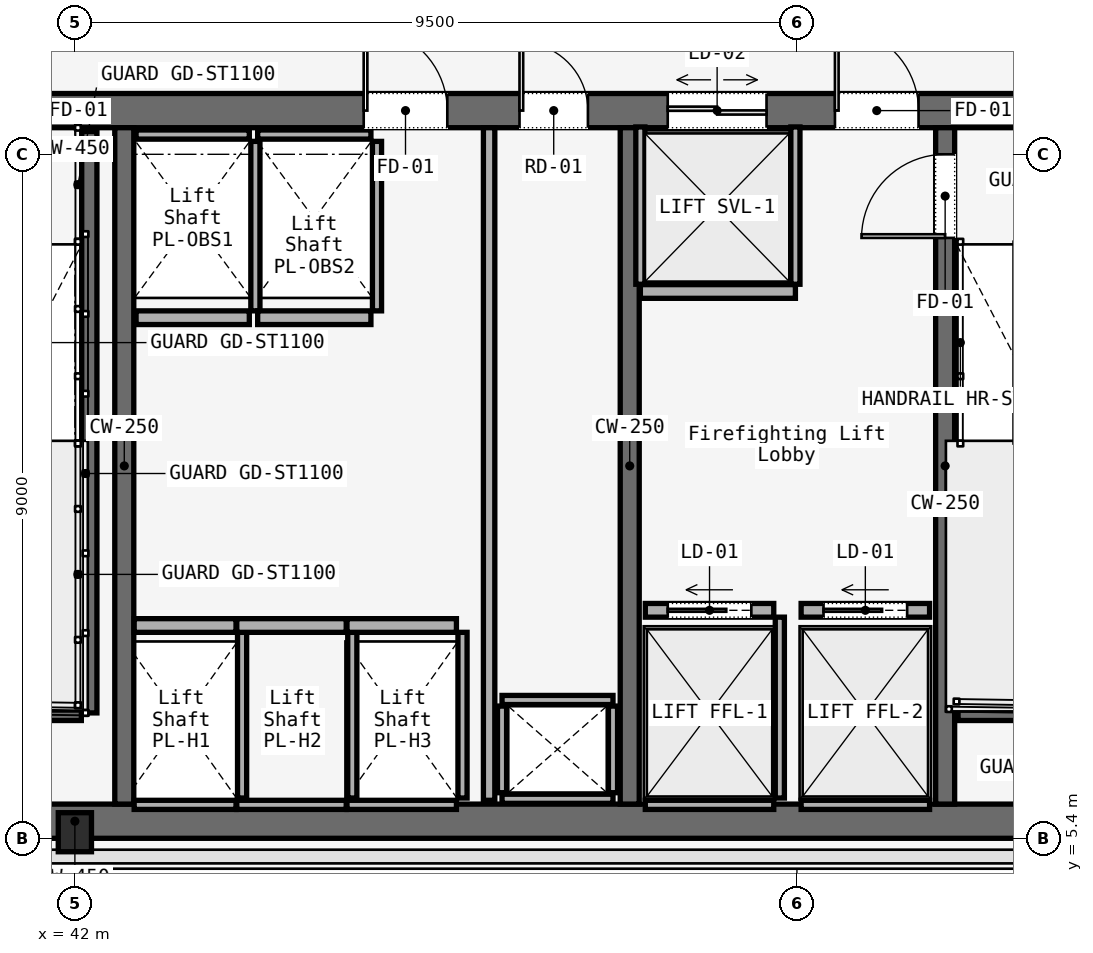
"""IFC4 building model, lengths in metres.
Left out: names, types, materials, properties, quantities, classifications, styles, units other than length and angle.
Written with IfcOpenShell. Run it as: python <this file> out.ifc"""

import sys

from ifc_helpers import new_model, si_unit, direction, frame, frame_2d, origin, origin_2d, place, context, subcontext, project, spatial, rectangle, i_section, extrude, element, fill, save


model = new_model("IFC4")
c1 = context("Model", 3, precision=1e-05, world=origin(), true_north=direction((0.0, 1.0)))
c2 = subcontext(c1, "Body", "Model", "MODEL_VIEW")
j1 = project(units=[si_unit("LENGTHUNIT", "METRE"), si_unit("PLANEANGLEUNIT", "RADIAN")], contexts=[c1])
p1 = place(None, origin())
s1 = spatial("IfcSite", under=j1, at=p1, CompositionType="ELEMENT")
p2 = place(p1, origin())
s2 = spatial("IfcBuilding", under=s1, at=p2, CompositionType="ELEMENT")
p3 = place(p2, frame((0.0, 0.0, 93.0)))
s3 = spatial("IfcBuildingStorey", under=s2, at=p3, CompositionType="ELEMENT", Elevation=93.0)
p4 = place(p3, frame((26.45, 14.975, 0.0), z_axis=(0.0, 0.0, 1.0), x_axis=(1.0, 0.0, 0.0)))
e1 = element("IfcWall", 1, at=p4, inside=s3, PredefinedType="SOLIDWALL", context=c2, shape_type="SweptSolid", body=[
    extrude(rectangle(XDim=31.1, YDim=0.45, at=frame_2d((15.55, 0.0))), origin(), (0.0, 0.0, 1.0), 3.58),
])
p5 = place(p4, frame((1.65, 0.0, 0.0)))
e2 = element("IfcOpeningElement", 2, at=p5, cuts=e1, PredefinedType="OPENING", context=c2, shape_type="SweptSolid", body=[
    extrude(rectangle(XDim=1.1, YDim=2.2, at=frame_2d((0.55, 1.1))), frame((0.0, 0.225, 0.0), z_axis=(0.0, -1.0, 0.0), x_axis=(1.0, 0.0, 0.0)), (0.0, 0.0, 1.0), 0.45),
])
p6 = place(p4, frame((13.65, 0.0, 0.0)))
e3 = element("IfcOpeningElement", 3, at=p6, cuts=e1, PredefinedType="OPENING", context=c2, shape_type="SweptSolid", body=[
    extrude(rectangle(XDim=1.1, YDim=2.2, at=frame_2d((0.55, 1.1))), frame((0.0, 0.225, 0.0), z_axis=(0.0, -1.0, 0.0), x_axis=(1.0, 0.0, 0.0)), (0.0, 0.0, 1.0), 0.45),
])
p7 = place(p4, frame((25.55, 0.0, 0.0)))
e4 = element("IfcOpeningElement", 4, at=p7, cuts=e1, PredefinedType="OPENING", context=c2, shape_type="SweptSolid", body=[
    extrude(rectangle(XDim=1.1, YDim=2.2, at=frame_2d((0.55, 1.1))), frame((0.0, 0.225, 0.0), z_axis=(0.0, -1.0, 0.0), x_axis=(1.0, 0.0, 0.0)), (0.0, 0.0, 1.0), 0.45),
])
p8 = place(p4, frame((10.7, 0.0, 0.0)))
e5 = element("IfcOpeningElement", 5, at=p8, cuts=e1, PredefinedType="OPENING", context=c2, shape_type="SweptSolid", body=[
    extrude(rectangle(XDim=1.4, YDim=2.2, at=frame_2d((0.7, 1.1))), frame((0.0, 0.225, 0.0), z_axis=(0.0, -1.0, 0.0), x_axis=(1.0, 0.0, 0.0)), (0.0, 0.0, 1.0), 0.45),
])
p9 = place(p4, frame((19.35, 0.0, 0.0)))
e6 = element("IfcOpeningElement", 6, at=p9, cuts=e1, PredefinedType="OPENING", context=c2, shape_type="SweptSolid", body=[
    extrude(rectangle(XDim=1.1, YDim=2.2, at=frame_2d((0.55, 1.1))), frame((0.0, 0.225, 0.0), z_axis=(0.0, -1.0, 0.0), x_axis=(1.0, 0.0, 0.0)), (0.0, 0.0, 1.0), 0.45),
])
p10 = place(p4, frame((21.4, 0.0, 0.0)))
e7 = element("IfcOpeningElement", 7, at=p10, cuts=e1, PredefinedType="OPENING", context=c2, shape_type="SweptSolid", body=[
    extrude(rectangle(XDim=0.9, YDim=2.1, at=frame_2d((0.45, 1.05))), frame((0.0, 0.225, 0.0), z_axis=(0.0, -1.0, 0.0), x_axis=(1.0, 0.0, 0.0)), (0.0, 0.0, 1.0), 0.45),
])
p11 = place(p4, frame((23.35, 0.0, 0.0)))
e8 = element("IfcOpeningElement", 8, at=p11, cuts=e1, PredefinedType="OPENING", context=c2, shape_type="SweptSolid", body=[
    extrude(rectangle(XDim=1.3, YDim=2.3, at=frame_2d((0.65, 1.15))), frame((0.0, 0.225, 0.0), z_axis=(0.0, -1.0, 0.0), x_axis=(1.0, 0.0, 0.0)), (0.0, 0.0, 1.0), 0.45),
])
p12 = place(p3, frame((26.45, 5.625, 0.0), z_axis=(0.0, 0.0, 1.0), x_axis=(1.0, 0.0, 0.0)))
e9 = element("IfcWall", 9, at=p12, inside=s3, PredefinedType="SOLIDWALL", context=c2, shape_type="SweptSolid", body=[
    extrude(rectangle(XDim=31.1, YDim=0.45, at=frame_2d((15.55, 0.0))), origin(), (0.0, 0.0, 1.0), 3.58),
])
for number, where, z_axis, x_axis in (
    (10, (42.65, 5.85, 0.0), (0.0, 0.0, 1.0), (0.0, 1.0, 0.0)),
    (11, (49.3, 5.85, 0.0), (0.0, 0.0, 1.0), (0.0, 1.0, 0.0)),
):
    element("IfcWall", number, at=place(p3, frame(where, z_axis=z_axis, x_axis=x_axis)), inside=s3, PredefinedType="SOLIDWALL", context=c2, shape_type="SweptSolid", body=[
        extrude(rectangle(XDim=8.9, YDim=0.25, at=frame_2d((4.45, 0.0))), origin(), (0.0, 0.0, 1.0), 3.58),
    ])
p13 = place(p3, frame((53.45, 5.85, 0.0), z_axis=(0.0, 0.0, 1.0), x_axis=(0.0, 1.0, 0.0)))
e12 = element("IfcWall", 12, at=p13, inside=s3, PredefinedType="SOLIDWALL", context=c2, shape_type="SweptSolid", body=[
    extrude(rectangle(XDim=8.9, YDim=0.25, at=frame_2d((4.45, 0.0))), origin(), (0.0, 0.0, 1.0), 3.58),
])
p14 = place(p13, frame((7.45, 0.0, 0.0)))
e13 = element("IfcOpeningElement", 13, at=p14, cuts=e12, PredefinedType="OPENING", context=c2, shape_type="SweptSolid", body=[
    extrude(rectangle(XDim=1.1, YDim=2.2, at=frame_2d((0.55, 1.1))), frame((0.0, 0.125, 0.0), z_axis=(0.0, -1.0, 0.0), x_axis=(1.0, 0.0, 0.0)), (0.0, 0.0, 1.0), 0.25),
])
p15 = place(p3, frame((42.0, 5.48, 0.0), z_axis=(0.0, 0.0, 1.0), x_axis=(1.0, 0.0, 0.0)))
e14 = element("IfcColumn", 14, at=p15, inside=s3, PredefinedType="COLUMN", context=c2, shape_type="SweptSolid", body=[
    extrude(i_section(OverallWidth=0.437, OverallDepth=0.514, WebThickness=0.061, FlangeThickness=0.077, FilletRadius=0.015, at=origin_2d()), origin(), (0.0, 0.0, 1.0), 3.58),
])
p16 = place(p3, frame((42.19, 14.7, 0.0), z_axis=(0.0, 0.0, 1.0), x_axis=(0.0, -1.0, 0.0)))
e15 = element("IfcWall", 15, at=p16, inside=s3, PredefinedType="SOLIDWALL", context=c2, shape_type="SweptSolid", body=[
    extrude(rectangle(XDim=7.65, YDim=0.2, at=frame_2d((3.825, 0.0))), origin(), (0.0, 0.0, 1.0), 3.8),
])
for number, where, z_axis, x_axis in (
    (16, (38.97, 7.05, 0.0), (0.0, 0.0, 1.0), (1.0, 0.0, 0.0)),
    (17, (53.62, 7.05, 0.0), (0.0, 0.0, 1.0), (1.0, 0.0, 0.0)),
):
    element("IfcWall", number, at=place(p3, frame(where, z_axis=z_axis, x_axis=x_axis)), inside=s3, PredefinedType="SOLIDWALL", context=c2, shape_type="SweptSolid", body=[
        extrude(rectangle(XDim=3.115, YDim=0.2, at=frame_2d((1.558, 0.0))), origin(), (0.0, 0.0, 1.0), 3.8),
    ])
for number, where, z_axis, x_axis in (
    (18, (47.62, 5.92, 0.0), (0.0, 0.0, 1.0), (1.0, 0.0, 0.0)),
    (19, (47.62, 7.22, 0.0), (0.0, 0.0, 1.0), (1.0, 0.0, 0.0)),
):
    element("IfcWall", number, at=place(p3, frame(where, z_axis=z_axis, x_axis=x_axis)), inside=s3, PredefinedType="SOLIDWALL", context=c2, shape_type="SweptSolid", body=[
        extrude(rectangle(XDim=1.46, YDim=0.12, at=frame_2d((0.73, 0.0))), origin(), (0.0, 0.0, 1.0), 2.95),
    ])
for number, where, z_axis, x_axis in (
    (20, (47.62, 6.0, 0.0), (0.0, 0.0, 1.0), (0.0, 1.0, 0.0)),
    (21, (49.08, 6.0, 0.0), (0.0, 0.0, 1.0), (0.0, 1.0, 0.0)),
):
    element("IfcWall", number, at=place(p3, frame(where, z_axis=z_axis, x_axis=x_axis)), inside=s3, PredefinedType="SOLIDWALL", context=c2, shape_type="SweptSolid", body=[
        extrude(rectangle(XDim=1.14, YDim=0.12, at=frame_2d((0.57, 0.0))), origin(), (0.0, 0.0, 1.0), 2.95),
    ])
p17 = place(p3, frame((47.45, 5.9, 0.0), z_axis=(0.0, 0.0, 1.0), x_axis=(0.0, 1.0, 0.0)))
e22 = element("IfcWall", 22, at=p17, inside=s3, PredefinedType="PARTITIONING", context=c2, shape_type="SweptSolid", body=[
    extrude(rectangle(XDim=8.85, YDim=0.15, at=frame_2d((4.425, 0.0))), origin(), (0.0, 0.0, 1.0), 2.95),
])
p18 = place(p3, frame((42.78, 8.2, 0.0), z_axis=(0.0, 0.0, 1.0), x_axis=(1.0, 0.0, 0.0)))
e23 = element("IfcWall", 23, at=p18, inside=s3, PredefinedType="SOLIDWALL", context=c2, shape_type="SweptSolid", body=[
    extrude(rectangle(XDim=1.34, YDim=0.18, at=frame_2d((0.67, 0.0))), origin(), (0.0, 0.0, 1.0), 2.95),
])
p19 = place(p3, frame((42.78, 5.84, 0.0), z_axis=(0.0, 0.0, 1.0), x_axis=(1.0, 0.0, 0.0)))
e24 = element("IfcWall", 24, at=p19, inside=s3, PredefinedType="SOLIDWALL", context=c2, shape_type="SweptSolid", body=[
    extrude(rectangle(XDim=1.34, YDim=0.12, at=frame_2d((0.67, 0.0))), origin(), (0.0, 0.0, 1.0), 2.95),
])
p20 = place(p3, frame((44.2, 5.93, 0.0), z_axis=(0.0, 0.0, 1.0), x_axis=(0.0, 1.0, 0.0)))
e25 = element("IfcWall", 25, at=p20, inside=s3, PredefinedType="SOLIDWALL", context=c2, shape_type="SweptSolid", body=[
    extrude(rectangle(XDim=2.18, YDim=0.12, at=frame_2d((1.09, 0.0))), origin(), (0.0, 0.0, 1.0), 2.95),
])
p21 = place(p3, frame((44.13, 8.2, 0.0), z_axis=(0.0, 0.0, 1.0), x_axis=(1.0, 0.0, 0.0)))
e26 = element("IfcWall", 26, at=p21, inside=s3, PredefinedType="SOLIDWALL", context=c2, shape_type="SweptSolid", body=[
    extrude(rectangle(XDim=1.44, YDim=0.18, at=frame_2d((0.72, 0.0))), origin(), (0.0, 0.0, 1.0), 2.95),
])
p22 = place(p3, frame((44.13, 5.84, 0.0), z_axis=(0.0, 0.0, 1.0), x_axis=(1.0, 0.0, 0.0)))
e27 = element("IfcWall", 27, at=p22, inside=s3, PredefinedType="SOLIDWALL", context=c2, shape_type="SweptSolid", body=[
    extrude(rectangle(XDim=1.44, YDim=0.12, at=frame_2d((0.72, 0.0))), origin(), (0.0, 0.0, 1.0), 2.95),
])
p23 = place(p3, frame((45.65, 5.93, 0.0), z_axis=(0.0, 0.0, 1.0), x_axis=(0.0, 1.0, 0.0)))
e28 = element("IfcWall", 28, at=p23, inside=s3, PredefinedType="SOLIDWALL", context=c2, shape_type="SweptSolid", body=[
    extrude(rectangle(XDim=2.18, YDim=0.12, at=frame_2d((1.09, 0.0))), origin(), (0.0, 0.0, 1.0), 2.95),
])
p24 = place(p3, frame((45.58, 8.2, 0.0), z_axis=(0.0, 0.0, 1.0), x_axis=(1.0, 0.0, 0.0)))
e29 = element("IfcWall", 29, at=p24, inside=s3, PredefinedType="SOLIDWALL", context=c2, shape_type="SweptSolid", body=[
    extrude(rectangle(XDim=1.44, YDim=0.18, at=frame_2d((0.72, 0.0))), origin(), (0.0, 0.0, 1.0), 2.95),
])
p25 = place(p3, frame((45.58, 5.84, 0.0), z_axis=(0.0, 0.0, 1.0), x_axis=(1.0, 0.0, 0.0)))
e30 = element("IfcWall", 30, at=p25, inside=s3, PredefinedType="SOLIDWALL", context=c2, shape_type="SweptSolid", body=[
    extrude(rectangle(XDim=1.44, YDim=0.12, at=frame_2d((0.72, 0.0))), origin(), (0.0, 0.0, 1.0), 2.95),
])
p26 = place(p3, frame((47.1, 5.93, 0.0), z_axis=(0.0, 0.0, 1.0), x_axis=(0.0, 1.0, 0.0)))
e31 = element("IfcWall", 31, at=p26, inside=s3, PredefinedType="SOLIDWALL", context=c2, shape_type="SweptSolid", body=[
    extrude(rectangle(XDim=2.18, YDim=0.12, at=frame_2d((1.09, 0.0))), origin(), (0.0, 0.0, 1.0), 2.95),
])
p27 = place(p3, frame((42.805, 12.25, 0.0), z_axis=(0.0, 0.0, 1.0), x_axis=(1.0, 0.0, 0.0)))
e32 = element("IfcWall", 32, at=p27, inside=s3, PredefinedType="SOLIDWALL", context=c2, shape_type="SweptSolid", body=[
    extrude(rectangle(XDim=1.49, YDim=0.18, at=frame_2d((0.745, 0.0))), origin(), (0.0, 0.0, 1.0), 2.95),
])
p28 = place(p3, frame((42.805, 14.66, 0.0), z_axis=(0.0, 0.0, 1.0), x_axis=(1.0, 0.0, 0.0)))
e33 = element("IfcWall", 33, at=p28, inside=s3, PredefinedType="SOLIDWALL", context=c2, shape_type="SweptSolid", body=[
    extrude(rectangle(XDim=1.49, YDim=0.12, at=frame_2d((0.745, 0.0))), origin(), (0.0, 0.0, 1.0), 2.95),
])
p29 = place(p3, frame((44.375, 12.34, 0.0), z_axis=(0.0, 0.0, 1.0), x_axis=(0.0, 1.0, 0.0)))
e34 = element("IfcWall", 34, at=p29, inside=s3, PredefinedType="SOLIDWALL", context=c2, shape_type="SweptSolid", body=[
    extrude(rectangle(XDim=2.23, YDim=0.12, at=frame_2d((1.115, 0.0))), origin(), (0.0, 0.0, 1.0), 2.95),
])
p30 = place(p3, frame((44.405, 12.25, 0.0), z_axis=(0.0, 0.0, 1.0), x_axis=(1.0, 0.0, 0.0)))
e35 = element("IfcWall", 35, at=p30, inside=s3, PredefinedType="SOLIDWALL", context=c2, shape_type="SweptSolid", body=[
    extrude(rectangle(XDim=1.49, YDim=0.18, at=frame_2d((0.745, 0.0))), origin(), (0.0, 0.0, 1.0), 2.95),
])
p31 = place(p3, frame((44.405, 14.66, 0.0), z_axis=(0.0, 0.0, 1.0), x_axis=(1.0, 0.0, 0.0)))
e36 = element("IfcWall", 36, at=p31, inside=s3, PredefinedType="SOLIDWALL", context=c2, shape_type="SweptSolid", body=[
    extrude(rectangle(XDim=1.49, YDim=0.12, at=frame_2d((0.745, 0.0))), origin(), (0.0, 0.0, 1.0), 2.95),
])
p32 = place(p3, frame((45.975, 12.34, 0.0), z_axis=(0.0, 0.0, 1.0), x_axis=(0.0, 1.0, 0.0)))
e37 = element("IfcWall", 37, at=p32, inside=s3, PredefinedType="SOLIDWALL", context=c2, shape_type="SweptSolid", body=[
    extrude(rectangle(XDim=2.23, YDim=0.12, at=frame_2d((1.115, 0.0))), origin(), (0.0, 0.0, 1.0), 2.95),
])
p33 = place(p3, frame((49.505, 8.4, 0.0), z_axis=(0.0, 0.0, 1.0), x_axis=(1.0, 0.0, 0.0)))
e38 = element("IfcWall", 38, at=p33, inside=s3, PredefinedType="SOLIDWALL", context=c2, shape_type="SweptSolid", body=[
    extrude(rectangle(XDim=1.69, YDim=0.18, at=frame_2d((0.845, 0.0))), origin(), (0.0, 0.0, 1.0), 2.95),
])
p34 = place(p33, frame((0.295, 0.0, 0.0)))
e39 = element("IfcOpeningElement", 39, at=p34, cuts=e38, PredefinedType="OPENING", context=c2, shape_type="SweptSolid", body=[
    extrude(rectangle(XDim=1.1, YDim=2.2, at=frame_2d((0.55, 1.1))), frame((0.0, 0.09, 0.0), z_axis=(0.0, -1.0, 0.0), x_axis=(1.0, 0.0, 0.0)), (0.0, 0.0, 1.0), 0.18),
])
p35 = place(p3, frame((49.505, 5.84, 0.0), z_axis=(0.0, 0.0, 1.0), x_axis=(1.0, 0.0, 0.0)))
e40 = element("IfcWall", 40, at=p35, inside=s3, PredefinedType="SOLIDWALL", context=c2, shape_type="SweptSolid", body=[
    extrude(rectangle(XDim=1.69, YDim=0.12, at=frame_2d((0.845, 0.0))), origin(), (0.0, 0.0, 1.0), 2.95),
])
p36 = place(p3, frame((51.275, 5.93, 0.0), z_axis=(0.0, 0.0, 1.0), x_axis=(0.0, 1.0, 0.0)))
e41 = element("IfcWall", 41, at=p36, inside=s3, PredefinedType="SOLIDWALL", context=c2, shape_type="SweptSolid", body=[
    extrude(rectangle(XDim=2.38, YDim=0.12, at=frame_2d((1.19, 0.0))), origin(), (0.0, 0.0, 1.0), 2.95),
])
p37 = place(p3, frame((51.555, 8.4, 0.0), z_axis=(0.0, 0.0, 1.0), x_axis=(1.0, 0.0, 0.0)))
e42 = element("IfcWall", 42, at=p37, inside=s3, PredefinedType="SOLIDWALL", context=c2, shape_type="SweptSolid", body=[
    extrude(rectangle(XDim=1.69, YDim=0.18, at=frame_2d((0.845, 0.0))), origin(), (0.0, 0.0, 1.0), 2.95),
])
p38 = place(p37, frame((0.295, 0.0, 0.0)))
e43 = element("IfcOpeningElement", 43, at=p38, cuts=e42, PredefinedType="OPENING", context=c2, shape_type="SweptSolid", body=[
    extrude(rectangle(XDim=1.1, YDim=2.2, at=frame_2d((0.55, 1.1))), frame((0.0, 0.09, 0.0), z_axis=(0.0, -1.0, 0.0), x_axis=(1.0, 0.0, 0.0)), (0.0, 0.0, 1.0), 0.18),
])
p39 = place(p3, frame((51.555, 5.84, 0.0), z_axis=(0.0, 0.0, 1.0), x_axis=(1.0, 0.0, 0.0)))
e44 = element("IfcWall", 44, at=p39, inside=s3, PredefinedType="SOLIDWALL", context=c2, shape_type="SweptSolid", body=[
    extrude(rectangle(XDim=1.69, YDim=0.12, at=frame_2d((0.845, 0.0))), origin(), (0.0, 0.0, 1.0), 2.95),
])
p40 = place(p3, frame((49.44, 12.595, 0.0), z_axis=(0.0, 0.0, 1.0), x_axis=(1.0, 0.0, 0.0)))
e45 = element("IfcWall", 45, at=p40, inside=s3, PredefinedType="SOLIDWALL", context=c2, shape_type="SweptSolid", body=[
    extrude(rectangle(XDim=2.04, YDim=0.18, at=frame_2d((1.02, 0.0))), origin(), (0.0, 0.0, 1.0), 2.95),
])
for number, where, z_axis, x_axis in (
    (46, (49.44, 12.69, 0.0), (0.0, 0.0, 1.0), (0.0, 1.0, 0.0)),
    (47, (51.48, 12.69, 0.0), (0.0, 0.0, 1.0), (0.0, 1.0, 0.0)),
):
    element("IfcWall", number, at=place(p3, frame(where, z_axis=z_axis, x_axis=x_axis)), inside=s3, PredefinedType="SOLIDWALL", context=c2, shape_type="SweptSolid", body=[
        extrude(rectangle(XDim=2.07, YDim=0.12, at=frame_2d((1.035, 0.0))), origin(), (0.0, 0.0, 1.0), 2.95),
    ])
p41 = place(p7, origin())
e48 = element("IfcDoor", 48, at=p41, inside=s3, OperationType="SINGLE_SWING_RIGHT", PredefinedType="DOOR", context=c2, shape_type="SweptSolid", body=[
    extrude(rectangle(XDim=1.1, YDim=2.2, at=frame_2d((0.55, 1.1))), frame((0.0, 0.025, 0.0), z_axis=(0.0, -1.0, 0.0), x_axis=(1.0, 0.0, 0.0)), (0.0, 0.0, 1.0), 0.05),
])
fill(e4, e48)
p42 = place(p9, origin())
e49 = element("IfcDoor", 49, at=p42, inside=s3, OperationType="SINGLE_SWING_LEFT", PredefinedType="DOOR", context=c2, shape_type="SweptSolid", body=[
    extrude(rectangle(XDim=1.1, YDim=2.2, at=frame_2d((0.55, 1.1))), frame((0.0, 0.025, 0.0), z_axis=(0.0, -1.0, 0.0), x_axis=(1.0, 0.0, 0.0)), (0.0, 0.0, 1.0), 0.05),
])
fill(e6, e49)
p43 = place(p10, origin())
e50 = element("IfcDoor", 50, at=p43, inside=s3, OperationType="SINGLE_SWING_LEFT", PredefinedType="DOOR", context=c2, shape_type="SweptSolid", body=[
    extrude(rectangle(XDim=0.9, YDim=2.1, at=frame_2d((0.45, 1.05))), frame((0.0, 0.025, 0.0), z_axis=(0.0, -1.0, 0.0), x_axis=(1.0, 0.0, 0.0)), (0.0, 0.0, 1.0), 0.05),
])
fill(e7, e50)
p44 = place(p14, origin())
e51 = element("IfcDoor", 51, at=p44, inside=s3, OperationType="SINGLE_SWING_LEFT", PredefinedType="DOOR", context=c2, shape_type="SweptSolid", body=[
    extrude(rectangle(XDim=1.1, YDim=2.2, at=frame_2d((0.55, 1.1))), frame((0.0, 0.025, 0.0), z_axis=(0.0, -1.0, 0.0), x_axis=(1.0, 0.0, 0.0)), (0.0, 0.0, 1.0), 0.05),
])
fill(e13, e51)
p45 = place(p34, origin())
e52 = element("IfcDoor", 52, at=p45, inside=s3, OperationType="SLIDING_TO_LEFT", PredefinedType="DOOR", context=c2, shape_type="SweptSolid", body=[
    extrude(rectangle(XDim=1.1, YDim=2.2, at=frame_2d((0.55, 1.1))), frame((0.0, 0.025, 0.0), z_axis=(0.0, -1.0, 0.0), x_axis=(1.0, 0.0, 0.0)), (0.0, 0.0, 1.0), 0.05),
])
fill(e39, e52)
p46 = place(p38, origin())
e53 = element("IfcDoor", 53, at=p46, inside=s3, OperationType="SLIDING_TO_LEFT", PredefinedType="DOOR", context=c2, shape_type="SweptSolid", body=[
    extrude(rectangle(XDim=1.1, YDim=2.2, at=frame_2d((0.55, 1.1))), frame((0.0, 0.025, 0.0), z_axis=(0.0, -1.0, 0.0), x_axis=(1.0, 0.0, 0.0)), (0.0, 0.0, 1.0), 0.05),
])
fill(e43, e53)
p47 = place(p11, origin())
e54 = element("IfcDoor", 54, at=p47, inside=s3, OperationType="DOUBLE_DOOR_SLIDING", PredefinedType="DOOR", context=c2, shape_type="SweptSolid", body=[
    extrude(rectangle(XDim=1.3, YDim=2.3, at=frame_2d((0.65, 1.15))), frame((0.0, 0.025, 0.0), z_axis=(0.0, -1.0, 0.0), x_axis=(1.0, 0.0, 0.0)), (0.0, 0.0, 1.0), 0.05),
])
fill(e8, e54)
save(model, sys.argv[1])
